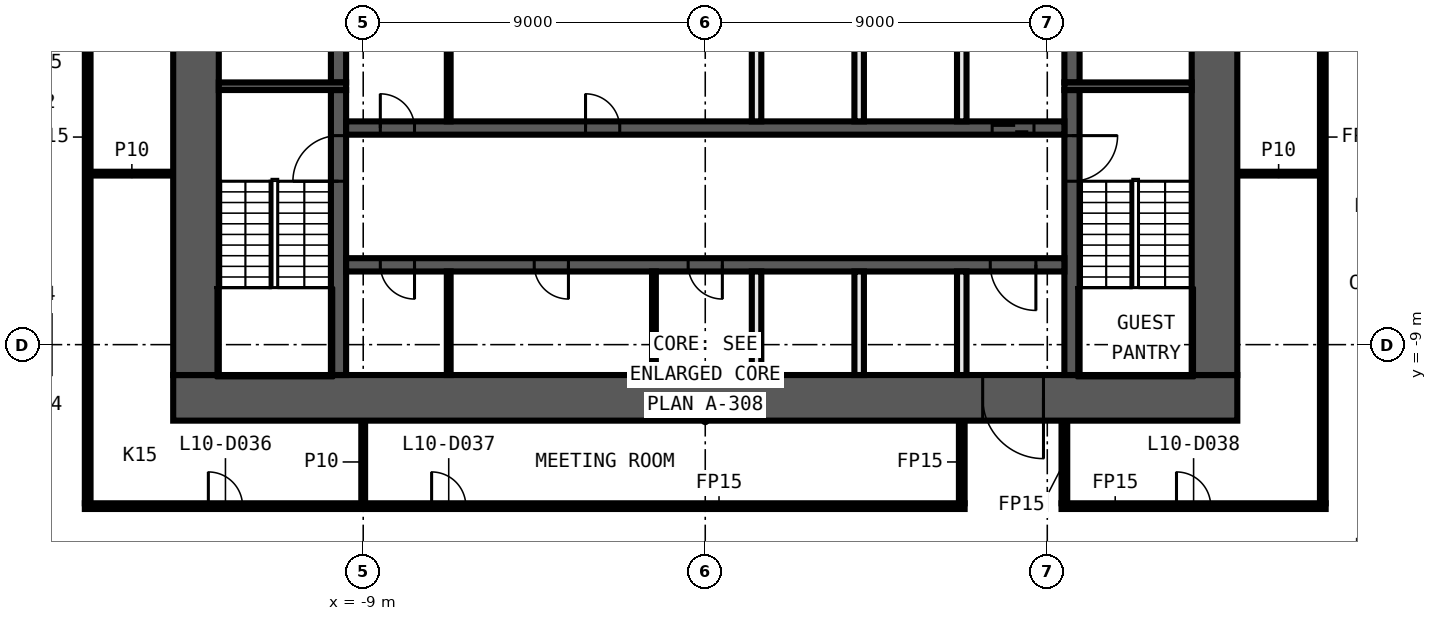
"""IFC4 building model, lengths in metres.
Left out: names, types, materials, properties, quantities, classifications, styles, units other than length and angle.
Written with IfcOpenShell. Run it as: python <this file> out.ifc"""

import sys

from ifc_helpers import new_model, si_unit, direction, frame, frame_2d, origin, place, context, subcontext, project, spatial, rectangle, extrude, element, fill, save


model = new_model("IFC4")
c1 = context("Model", 3, precision=1e-05, world=origin(), true_north=direction((0.0, 1.0)))
c2 = subcontext(c1, "Body", "Model", "MODEL_VIEW")
j1 = project(units=[si_unit("LENGTHUNIT", "METRE"), si_unit("PLANEANGLEUNIT", "RADIAN")], contexts=[c1])
p1 = place(None, origin())
s1 = spatial("IfcSite", under=j1, at=p1, CompositionType="ELEMENT")
p2 = place(p1, origin())
s2 = spatial("IfcBuilding", under=s1, at=p2, CompositionType="ELEMENT")
p3 = place(p2, frame((0.0, 0.0, 58.8)))
s3 = spatial("IfcBuildingStorey", under=s2, at=p3, CompositionType="ELEMENT", Elevation=58.8)
p4 = place(p3, frame((-16.325, -13.25, 0.0), z_axis=(0.0, 0.0, 1.0), x_axis=(1.0, 0.0, 0.0)))
e1 = element("IfcWall", 1, at=p4, inside=s3, PredefinedType="PARTITIONING", context=c2, shape_type="SweptSolid", body=[
    extrude(rectangle(XDim=23.15, YDim=0.15, at=frame_2d((11.575, 0.0))), origin(), (0.0, 0.0, 1.0), 3.3),
])
p5 = place(p4, frame((3.25, 0.0, 0.0)))
e2 = element("IfcOpeningElement", 2, at=p5, cuts=e1, PredefinedType="OPENING", context=c2, shape_type="SweptSolid", body=[
    extrude(rectangle(XDim=0.9, YDim=2.1, at=frame_2d((0.45, 1.05))), frame((0.0, 0.085, 0.0), z_axis=(0.0, -1.0, 0.0), x_axis=(1.0, 0.0, 0.0)), (0.0, 0.0, 1.0), 0.17),
])
p6 = place(p4, frame((9.125, 0.0, 0.0)))
e3 = element("IfcOpeningElement", 3, at=p6, cuts=e1, PredefinedType="OPENING", context=c2, shape_type="SweptSolid", body=[
    extrude(rectangle(XDim=0.9, YDim=2.1, at=frame_2d((0.45, 1.05))), frame((0.0, 0.085, 0.0), z_axis=(0.0, -1.0, 0.0), x_axis=(1.0, 0.0, 0.0)), (0.0, 0.0, 1.0), 0.17),
])
p7 = place(p3, frame((9.375, -13.25, 0.0), z_axis=(0.0, 0.0, 1.0), x_axis=(1.0, 0.0, 0.0)))
e4 = element("IfcWall", 4, at=p7, inside=s3, PredefinedType="PARTITIONING", context=c2, shape_type="SweptSolid", body=[
    extrude(rectangle(XDim=6.95, YDim=0.15, at=frame_2d((3.475, 0.0))), origin(), (0.0, 0.0, 1.0), 3.3),
])
p8 = place(p7, frame((3.025, 0.0, 0.0)))
e5 = element("IfcOpeningElement", 5, at=p8, cuts=e4, PredefinedType="OPENING", context=c2, shape_type="SweptSolid", body=[
    extrude(rectangle(XDim=0.9, YDim=2.1, at=frame_2d((0.45, 1.05))), frame((0.0, 0.085, 0.0), z_axis=(0.0, -1.0, 0.0), x_axis=(1.0, 0.0, 0.0)), (0.0, 0.0, 1.0), 0.17),
])
for number, where, z_axis, x_axis in (
    (6, (-16.175, -4.5, 0.0), (0.0, 0.0, 1.0), (1.0, 0.0, 0.0)),
    (7, (14.0, -4.5, 0.0), (0.0, 0.0, 1.0), (1.0, 0.0, 0.0)),
):
    element("IfcWall", number, at=place(p3, frame(where, z_axis=z_axis, x_axis=x_axis)), inside=s3, PredefinedType="PARTITIONING", context=c2, shape_type="SweptSolid", body=[
        extrude(rectangle(XDim=2.175, YDim=0.1, at=frame_2d((1.087, 0.0))), origin(), (0.0, 0.0, 1.0), 3.3),
    ])
p9 = place(p3, frame((16.25, -13.175, 0.0), z_axis=(0.0, 0.0, 1.0), x_axis=(0.0, 1.0, 0.0)))
e8 = element("IfcWall", 8, at=p9, inside=s3, PredefinedType="PARTITIONING", context=c2, shape_type="SweptSolid", body=[
    extrude(rectangle(XDim=26.35, YDim=0.15, at=frame_2d((13.175, 0.0))), origin(), (0.0, 0.0, 1.0), 3.3),
])
p10 = place(p9, frame((19.475, 0.0, 0.0)))
e9 = element("IfcOpeningElement", 9, at=p10, cuts=e8, PredefinedType="OPENING", context=c2, shape_type="SweptSolid", body=[
    extrude(rectangle(XDim=0.9, YDim=2.1, at=frame_2d((0.45, 1.05))), frame((0.0, 0.085, 0.0), z_axis=(0.0, -1.0, 0.0), x_axis=(1.0, 0.0, 0.0)), (0.0, 0.0, 1.0), 0.17),
])
for number, where, z_axis, x_axis in (
    (10, (9.45, -13.175, 0.0), (0.0, 0.0, 1.0), (0.0, 1.0, 0.0)),
    (11, (6.75, -13.175, 0.0), (0.0, 0.0, 1.0), (0.0, 1.0, 0.0)),
):
    element("IfcWall", number, at=place(p3, frame(where, z_axis=z_axis, x_axis=x_axis)), inside=s3, PredefinedType="PARTITIONING", context=c2, shape_type="SweptSolid", body=[
        extrude(rectangle(XDim=2.175, YDim=0.15, at=frame_2d((1.087, 0.0))), origin(), (0.0, 0.0, 1.0), 3.3),
    ])
p11 = place(p3, frame((-9.0, -13.175, 0.0), z_axis=(0.0, 0.0, 1.0), x_axis=(0.0, 1.0, 0.0)))
e12 = element("IfcWall", 12, at=p11, inside=s3, PredefinedType="PARTITIONING", context=c2, shape_type="SweptSolid", body=[
    extrude(rectangle(XDim=2.175, YDim=0.1, at=frame_2d((1.087, 0.0))), origin(), (0.0, 0.0, 1.0), 3.3),
])
p12 = place(p3, frame((-16.25, 13.175, 0.0), z_axis=(0.0, 0.0, 1.0), x_axis=(0.0, -1.0, 0.0)))
e13 = element("IfcWall", 13, at=p12, inside=s3, PredefinedType="PARTITIONING", context=c2, shape_type="SweptSolid", body=[
    extrude(rectangle(XDim=26.35, YDim=0.15, at=frame_2d((13.175, 0.0))), origin(), (0.0, 0.0, 1.0), 3.3),
])
p13 = place(p12, frame((5.975, 0.0, 0.0)))
e14 = element("IfcOpeningElement", 14, at=p13, cuts=e13, PredefinedType="OPENING", context=c2, shape_type="SweptSolid", body=[
    extrude(rectangle(XDim=0.9, YDim=2.1, at=frame_2d((0.45, 1.05))), frame((0.0, 0.085, 0.0), z_axis=(0.0, -1.0, 0.0), x_axis=(1.0, 0.0, 0.0)), (0.0, 0.0, 1.0), 0.17),
])
p14 = place(p3, frame((14.0, -10.4, 0.0), z_axis=(0.0, 0.0, 1.0), x_axis=(-1.0, 0.0, 0.0)))
e15 = element("IfcWall", 15, at=p14, inside=s3, PredefinedType="SHEAR", context=c2, shape_type="SweptSolid", body=[
    extrude(rectangle(XDim=28.0, YDim=1.2, at=frame_2d((14.0, 0.0))), origin(), (0.0, 0.0, 1.0), 3.3),
])
p15 = place(p14, frame((5.1, 0.0, 0.0)))
e16 = element("IfcOpeningElement", 16, at=p15, cuts=e15, PredefinedType="OPENING", context=c2, shape_type="SweptSolid", body=[
    extrude(rectangle(XDim=1.6, YDim=2.1, at=frame_2d((0.8, 1.05))), frame((0.0, 0.61, 0.0), z_axis=(0.0, -1.0, 0.0), x_axis=(1.0, 0.0, 0.0)), (0.0, 0.0, 1.0), 1.22),
])
for number, where, z_axis, x_axis in (
    (17, (13.4, 9.8, 0.0), (0.0, 0.0, 1.0), (0.0, -1.0, 0.0)),
    (18, (-13.4, -9.8, 0.0), (0.0, 0.0, 1.0), (0.0, 1.0, 0.0)),
):
    element("IfcWall", number, at=place(p3, frame(where, z_axis=z_axis, x_axis=x_axis)), inside=s3, PredefinedType="SHEAR", context=c2, shape_type="SweptSolid", body=[
        extrude(rectangle(XDim=19.6, YDim=1.2, at=frame_2d((9.8, 0.0))), origin(), (0.0, 0.0, 1.0), 3.3),
    ])
p16 = place(p3, frame((9.65, -2.3, 0.0), z_axis=(0.0, 0.0, 1.0), x_axis=(0.0, -1.0, 0.0)))
e19 = element("IfcWall", 19, at=p16, inside=s3, PredefinedType="SHEAR", context=c2, shape_type="SweptSolid", body=[
    extrude(rectangle(XDim=7.5, YDim=0.4, at=frame_2d((3.75, 0.0))), origin(), (0.0, 0.0, 1.0), 3.3),
])
p17 = place(p16, frame((1.2, 0.0, 0.0)))
e20 = element("IfcOpeningElement", 20, at=p17, cuts=e19, PredefinedType="OPENING", context=c2, shape_type="SweptSolid", body=[
    extrude(rectangle(XDim=1.2, YDim=2.1, at=frame_2d((0.6, 1.05))), frame((0.0, 0.21, 0.0), z_axis=(0.0, -1.0, 0.0), x_axis=(1.0, 0.0, 0.0)), (0.0, 0.0, 1.0), 0.42),
])
p18 = place(p3, frame((9.65, 2.1, 0.0), z_axis=(0.0, 0.0, 1.0), x_axis=(0.0, -1.0, 0.0)))
e21 = element("IfcWall", 21, at=p18, inside=s3, PredefinedType="SHEAR", context=c2, shape_type="SweptSolid", body=[
    extrude(rectangle(XDim=4.2, YDim=0.4, at=frame_2d((2.1, 0.0))), origin(), (0.0, 0.0, 1.0), 3.3),
])
p19 = place(p18, frame((0.15, 0.0, 0.0)))
e22 = element("IfcOpeningElement", 22, at=p19, cuts=e21, PredefinedType="OPENING", context=c2, shape_type="SweptSolid", body=[
    extrude(rectangle(XDim=0.9, YDim=2.1, at=frame_2d((0.45, 1.05))), frame((0.0, 0.21, 0.0), z_axis=(0.0, -1.0, 0.0), x_axis=(1.0, 0.0, 0.0)), (0.0, 0.0, 1.0), 0.42),
])
p20 = place(p3, frame((-9.65, -9.8, 0.0), z_axis=(0.0, 0.0, 1.0), x_axis=(0.0, 1.0, 0.0)))
e23 = element("IfcWall", 23, at=p20, inside=s3, PredefinedType="SHEAR", context=c2, shape_type="SweptSolid", body=[
    extrude(rectangle(XDim=7.5, YDim=0.4, at=frame_2d((3.75, 0.0))), origin(), (0.0, 0.0, 1.0), 3.3),
])
p21 = place(p20, frame((5.1, 0.0, 0.0)))
e24 = element("IfcOpeningElement", 24, at=p21, cuts=e23, PredefinedType="OPENING", context=c2, shape_type="SweptSolid", body=[
    extrude(rectangle(XDim=1.2, YDim=2.1, at=frame_2d((0.6, 1.05))), frame((0.0, 0.21, 0.0), z_axis=(0.0, -1.0, 0.0), x_axis=(1.0, 0.0, 0.0)), (0.0, 0.0, 1.0), 0.42),
])
p22 = place(p3, frame((-9.65, -2.1, 0.0), z_axis=(0.0, 0.0, 1.0), x_axis=(0.0, 1.0, 0.0)))
e25 = element("IfcWall", 25, at=p22, inside=s3, PredefinedType="SHEAR", context=c2, shape_type="SweptSolid", body=[
    extrude(rectangle(XDim=4.2, YDim=0.4, at=frame_2d((2.1, 0.0))), origin(), (0.0, 0.0, 1.0), 3.3),
])
for number, where, z_axis, x_axis in (
    (26, (9.45, -2.2, 0.0), (0.0, 0.0, 1.0), (1.0, 0.0, 0.0)),
    (27, (-9.45, -2.2, 0.0), (0.0, 0.0, 1.0), (-1.0, 0.0, 0.0)),
):
    element("IfcWall", number, at=place(p3, frame(where, z_axis=z_axis, x_axis=x_axis)), inside=s3, PredefinedType="SHEAR", context=c2, shape_type="SweptSolid", body=[
        extrude(rectangle(XDim=3.35, YDim=0.2, at=frame_2d((1.675, 0.0))), origin(), (0.0, 0.0, 1.0), 3.3),
    ])
p23 = place(p3, frame((-9.45, -3.3, 0.0), z_axis=(0.0, 0.0, 1.0), x_axis=(1.0, 0.0, 0.0)))
e28 = element("IfcWall", 28, at=p23, inside=s3, PredefinedType="SHEAR", context=c2, shape_type="SweptSolid", body=[
    extrude(rectangle(XDim=18.9, YDim=0.35, at=frame_2d((9.45, 0.0))), origin(), (0.0, 0.0, 1.0), 3.3),
])
p24 = place(p23, frame((17.0, 0.0, 0.0)))
e29 = element("IfcOpeningElement", 29, at=p24, cuts=e28, PredefinedType="OPENING", context=c2, shape_type="SweptSolid", body=[
    extrude(rectangle(XDim=1.1, YDim=2.1, at=frame_2d((0.55, 1.05))), frame((0.0, 0.185, 0.0), z_axis=(0.0, -1.0, 0.0), x_axis=(1.0, 0.0, 0.0)), (0.0, 0.0, 1.0), 0.37),
])
p25 = place(p23, frame((0.9, 0.0, 0.0)))
e30 = element("IfcOpeningElement", 30, at=p25, cuts=e28, PredefinedType="OPENING", context=c2, shape_type="SweptSolid", body=[
    extrude(rectangle(XDim=0.9, YDim=2.1, at=frame_2d((0.45, 1.05))), frame((0.0, 0.185, 0.0), z_axis=(0.0, -1.0, 0.0), x_axis=(1.0, 0.0, 0.0)), (0.0, 0.0, 1.0), 0.37),
])
p26 = place(p23, frame((6.3, 0.0, 0.0)))
e31 = element("IfcOpeningElement", 31, at=p26, cuts=e28, PredefinedType="OPENING", context=c2, shape_type="SweptSolid", body=[
    extrude(rectangle(XDim=0.9, YDim=2.1, at=frame_2d((0.45, 1.05))), frame((0.0, 0.185, 0.0), z_axis=(0.0, -1.0, 0.0), x_axis=(1.0, 0.0, 0.0)), (0.0, 0.0, 1.0), 0.37),
])
p27 = place(p3, frame((9.45, -6.9, 0.0), z_axis=(0.0, 0.0, 1.0), x_axis=(-1.0, 0.0, 0.0)))
e32 = element("IfcWall", 32, at=p27, inside=s3, PredefinedType="SHEAR", context=c2, shape_type="SweptSolid", body=[
    extrude(rectangle(XDim=18.9, YDim=0.35, at=frame_2d((9.45, 0.0))), origin(), (0.0, 0.0, 1.0), 3.3),
])
p28 = place(p27, frame((0.75, 0.0, 0.0)))
e33 = element("IfcOpeningElement", 33, at=p28, cuts=e32, PredefinedType="OPENING", context=c2, shape_type="SweptSolid", body=[
    extrude(rectangle(XDim=1.2, YDim=2.1, at=frame_2d((0.6, 1.05))), frame((0.0, 0.185, 0.0), z_axis=(0.0, -1.0, 0.0), x_axis=(1.0, 0.0, 0.0)), (0.0, 0.0, 1.0), 0.37),
])
p29 = place(p27, frame((17.1, 0.0, 0.0)))
e34 = element("IfcOpeningElement", 34, at=p29, cuts=e32, PredefinedType="OPENING", context=c2, shape_type="SweptSolid", body=[
    extrude(rectangle(XDim=0.9, YDim=2.1, at=frame_2d((0.45, 1.05))), frame((0.0, 0.185, 0.0), z_axis=(0.0, -1.0, 0.0), x_axis=(1.0, 0.0, 0.0)), (0.0, 0.0, 1.0), 0.37),
])
p30 = place(p27, frame((13.05, 0.0, 0.0)))
e35 = element("IfcOpeningElement", 35, at=p30, cuts=e32, PredefinedType="OPENING", context=c2, shape_type="SweptSolid", body=[
    extrude(rectangle(XDim=0.9, YDim=2.1, at=frame_2d((0.45, 1.05))), frame((0.0, 0.185, 0.0), z_axis=(0.0, -1.0, 0.0), x_axis=(1.0, 0.0, 0.0)), (0.0, 0.0, 1.0), 0.37),
])
p31 = place(p27, frame((9.0, 0.0, 0.0)))
e36 = element("IfcOpeningElement", 36, at=p31, cuts=e32, PredefinedType="OPENING", context=c2, shape_type="SweptSolid", body=[
    extrude(rectangle(XDim=0.9, YDim=2.1, at=frame_2d((0.45, 1.05))), frame((0.0, 0.185, 0.0), z_axis=(0.0, -1.0, 0.0), x_axis=(1.0, 0.0, 0.0)), (0.0, 0.0, 1.0), 0.37),
])
for number, where, z_axis, x_axis in (
    (37, (6.75, -9.8, 0.0), (0.0, 0.0, 1.0), (0.0, 1.0, 0.0)),
    (38, (6.75, -3.125, 0.0), (0.0, 0.0, 1.0), (0.0, 1.0, 0.0)),
    (39, (4.05, -9.8, 0.0), (0.0, 0.0, 1.0), (0.0, 1.0, 0.0)),
    (40, (4.05, -3.125, 0.0), (0.0, 0.0, 1.0), (0.0, 1.0, 0.0)),
    (41, (1.35, -9.8, 0.0), (0.0, 0.0, 1.0), (0.0, 1.0, 0.0)),
    (42, (1.35, -3.125, 0.0), (0.0, 0.0, 1.0), (0.0, 1.0, 0.0)),
):
    element("IfcWall", number, at=place(p3, frame(where, z_axis=z_axis, x_axis=x_axis)), inside=s3, PredefinedType="SOLIDWALL", context=c2, shape_type="SweptSolid", body=[
        extrude(rectangle(XDim=2.725, YDim=0.25, at=frame_2d((1.363, 0.0))), origin(), (0.0, 0.0, 1.0), 3.3),
    ])
for number, where, z_axis, x_axis in (
    (43, (-1.35, -9.8, 0.0), (0.0, 0.0, 1.0), (0.0, 1.0, 0.0)),
    (44, (-6.75, -9.8, 0.0), (0.0, 0.0, 1.0), (0.0, 1.0, 0.0)),
    (45, (-6.75, -3.125, 0.0), (0.0, 0.0, 1.0), (0.0, 1.0, 0.0)),
):
    element("IfcWall", number, at=place(p3, frame(where, z_axis=z_axis, x_axis=x_axis)), inside=s3, PredefinedType="PARTITIONING", context=c2, shape_type="SweptSolid", body=[
        extrude(rectangle(XDim=2.725, YDim=0.1, at=frame_2d((1.363, 0.0))), origin(), (0.0, 0.0, 1.0), 3.3),
    ])
p32 = place(p5, origin())
e46 = element("IfcDoor", 46, at=p32, inside=s3, OperationType="SINGLE_SWING_LEFT", PredefinedType="DOOR", context=c2, shape_type="SweptSolid", body=[
    extrude(rectangle(XDim=0.9, YDim=2.1, at=frame_2d((0.45, 1.05))), frame((0.0, 0.025, 0.0), z_axis=(0.0, -1.0, 0.0), x_axis=(1.0, 0.0, 0.0)), (0.0, 0.0, 1.0), 0.05),
])
fill(e2, e46)
p33 = place(p6, origin())
e47 = element("IfcDoor", 47, at=p33, inside=s3, OperationType="SINGLE_SWING_RIGHT", PredefinedType="DOOR", context=c2, shape_type="SweptSolid", body=[
    extrude(rectangle(XDim=0.9, YDim=2.1, at=frame_2d((0.45, 1.05))), frame((0.0, 0.025, 0.0), z_axis=(0.0, -1.0, 0.0), x_axis=(1.0, 0.0, 0.0)), (0.0, 0.0, 1.0), 0.05),
])
fill(e3, e47)
p34 = place(p8, origin())
e48 = element("IfcDoor", 48, at=p34, inside=s3, OperationType="SINGLE_SWING_LEFT", PredefinedType="DOOR", context=c2, shape_type="SweptSolid", body=[
    extrude(rectangle(XDim=0.9, YDim=2.1, at=frame_2d((0.45, 1.05))), frame((0.0, 0.025, 0.0), z_axis=(0.0, -1.0, 0.0), x_axis=(1.0, 0.0, 0.0)), (0.0, 0.0, 1.0), 0.05),
])
fill(e5, e48)
p35 = place(p24, origin())
e49 = element("IfcDoor", 49, at=p35, inside=s3, OperationType="DOUBLE_DOOR_SLIDING", PredefinedType="DOOR", context=c2, shape_type="SweptSolid", body=[
    extrude(rectangle(XDim=1.1, YDim=2.1, at=frame_2d((0.55, 1.05))), frame((0.0, 0.025, 0.0), z_axis=(0.0, -1.0, 0.0), x_axis=(1.0, 0.0, 0.0)), (0.0, 0.0, 1.0), 0.05),
])
fill(e29, e49)
p36 = place(p15, origin())
e50 = element("IfcDoor", 50, at=p36, inside=s3, OperationType="DOUBLE_DOOR_SINGLE_SWING", PredefinedType="DOOR", context=c2, shape_type="SweptSolid", body=[
    extrude(rectangle(XDim=1.6, YDim=2.1, at=frame_2d((0.8, 1.05))), frame((0.0, 0.025, 0.0), z_axis=(0.0, -1.0, 0.0), x_axis=(1.0, 0.0, 0.0)), (0.0, 0.0, 1.0), 0.05),
])
fill(e16, e50)
p37 = place(p28, origin())
e51 = element("IfcDoor", 51, at=p37, inside=s3, OperationType="SINGLE_SWING_LEFT", PredefinedType="DOOR", context=c2, shape_type="SweptSolid", body=[
    extrude(rectangle(XDim=1.2, YDim=2.1, at=frame_2d((0.6, 1.05))), frame((0.0, 0.025, 0.0), z_axis=(0.0, -1.0, 0.0), x_axis=(1.0, 0.0, 0.0)), (0.0, 0.0, 1.0), 0.05),
])
fill(e33, e51)
p38 = place(p25, origin())
e52 = element("IfcDoor", 52, at=p38, inside=s3, OperationType="SINGLE_SWING_RIGHT", PredefinedType="DOOR", context=c2, shape_type="SweptSolid", body=[
    extrude(rectangle(XDim=0.9, YDim=2.1, at=frame_2d((0.45, 1.05))), frame((0.0, 0.025, 0.0), z_axis=(0.0, -1.0, 0.0), x_axis=(1.0, 0.0, 0.0)), (0.0, 0.0, 1.0), 0.05),
])
fill(e30, e52)
p39 = place(p26, origin())
e53 = element("IfcDoor", 53, at=p39, inside=s3, OperationType="SINGLE_SWING_LEFT", PredefinedType="DOOR", context=c2, shape_type="SweptSolid", body=[
    extrude(rectangle(XDim=0.9, YDim=2.1, at=frame_2d((0.45, 1.05))), frame((0.0, 0.025, 0.0), z_axis=(0.0, -1.0, 0.0), x_axis=(1.0, 0.0, 0.0)), (0.0, 0.0, 1.0), 0.05),
])
fill(e31, e53)
p40 = place(p29, origin())
e54 = element("IfcDoor", 54, at=p40, inside=s3, OperationType="SINGLE_SWING_RIGHT", PredefinedType="DOOR", context=c2, shape_type="SweptSolid", body=[
    extrude(rectangle(XDim=0.9, YDim=2.1, at=frame_2d((0.45, 1.05))), frame((0.0, 0.025, 0.0), z_axis=(0.0, -1.0, 0.0), x_axis=(1.0, 0.0, 0.0)), (0.0, 0.0, 1.0), 0.05),
])
fill(e34, e54)
p41 = place(p30, origin())
e55 = element("IfcDoor", 55, at=p41, inside=s3, OperationType="SINGLE_SWING_LEFT", PredefinedType="DOOR", context=c2, shape_type="SweptSolid", body=[
    extrude(rectangle(XDim=0.9, YDim=2.1, at=frame_2d((0.45, 1.05))), frame((0.0, 0.025, 0.0), z_axis=(0.0, -1.0, 0.0), x_axis=(1.0, 0.0, 0.0)), (0.0, 0.0, 1.0), 0.05),
])
fill(e35, e55)
p42 = place(p31, origin())
e56 = element("IfcDoor", 56, at=p42, inside=s3, OperationType="SINGLE_SWING_RIGHT", PredefinedType="DOOR", context=c2, shape_type="SweptSolid", body=[
    extrude(rectangle(XDim=0.9, YDim=2.1, at=frame_2d((0.45, 1.05))), frame((0.0, 0.025, 0.0), z_axis=(0.0, -1.0, 0.0), x_axis=(1.0, 0.0, 0.0)), (0.0, 0.0, 1.0), 0.05),
])
fill(e36, e56)
p43 = place(p17, origin())
e57 = element("IfcDoor", 57, at=p43, inside=s3, OperationType="SINGLE_SWING_RIGHT", PredefinedType="DOOR", context=c2, shape_type="SweptSolid", body=[
    extrude(rectangle(XDim=1.2, YDim=2.1, at=frame_2d((0.6, 1.05))), frame((0.0, 0.025, 0.0), z_axis=(0.0, -1.0, 0.0), x_axis=(1.0, 0.0, 0.0)), (0.0, 0.0, 1.0), 0.05),
])
fill(e20, e57)
p44 = place(p21, origin())
e58 = element("IfcDoor", 58, at=p44, inside=s3, OperationType="SINGLE_SWING_LEFT", PredefinedType="DOOR", context=c2, shape_type="SweptSolid", body=[
    extrude(rectangle(XDim=1.2, YDim=2.1, at=frame_2d((0.6, 1.05))), frame((0.0, 0.025, 0.0), z_axis=(0.0, -1.0, 0.0), x_axis=(1.0, 0.0, 0.0)), (0.0, 0.0, 1.0), 0.05),
])
fill(e24, e58)
save(model, sys.argv[1])
